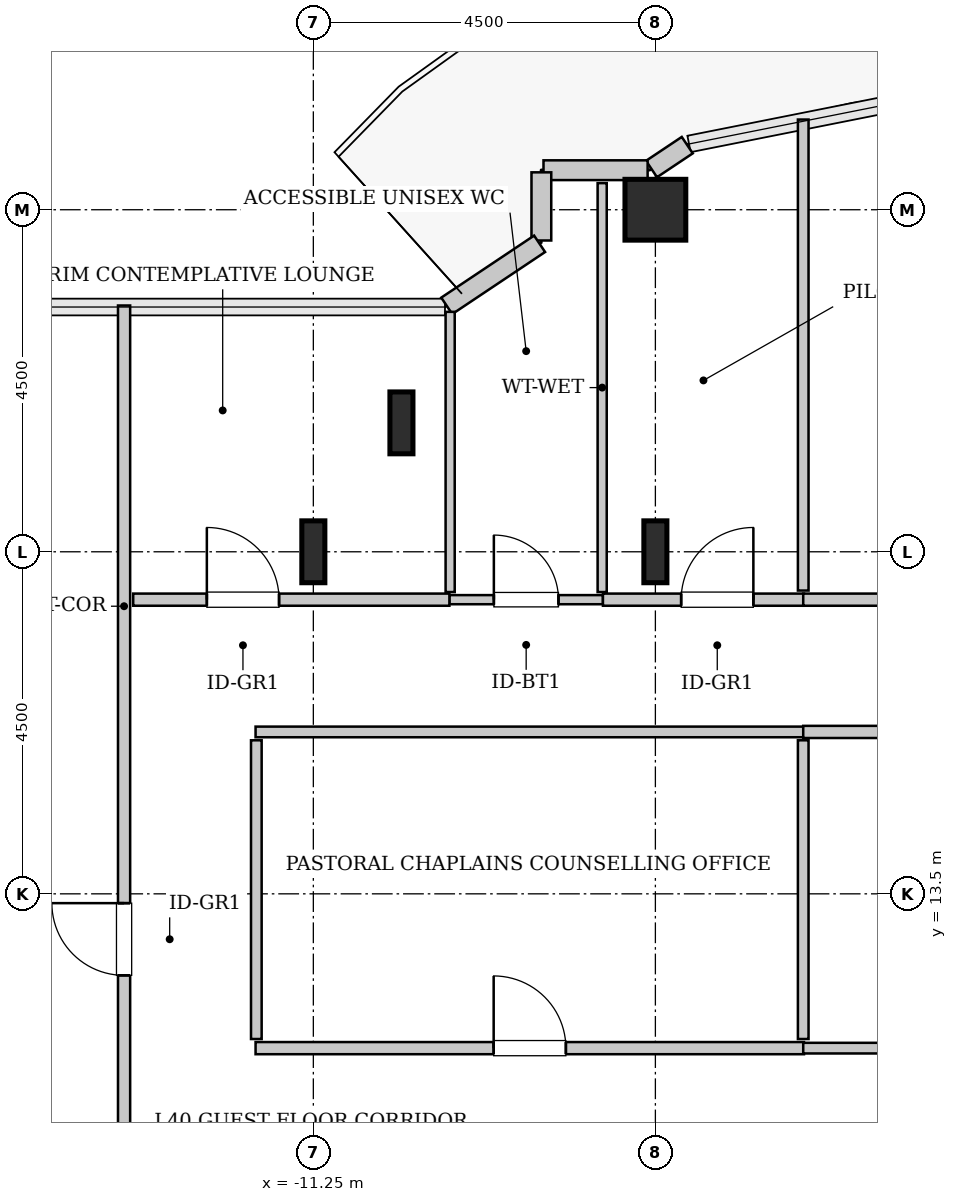
"""IFC4 building model, lengths in metres.
Left out: names, types, materials, properties, quantities, classifications, styles, units other than length and angle.
Written with IfcOpenShell. Run it as: python <this file> out.ifc"""

import sys

from ifc_helpers import new_model, si_unit, direction, frame, frame_2d, origin, origin_2d, place, context, subcontext, project, spatial, rectangle, hollow_rectangle, i_section, extrude, source, transform, mapped, element, fill, save


model = new_model("IFC4")
c1 = context("Model", 3, precision=1e-05, world=origin(), true_north=direction((0.0, 1.0)))
c2 = subcontext(c1, "Body", "Model", "MODEL_VIEW")
j1 = project(units=[si_unit("LENGTHUNIT", "METRE"), si_unit("PLANEANGLEUNIT", "RADIAN")], contexts=[c1])
p1 = place(None, origin())
s1 = spatial("IfcSite", under=j1, at=p1, CompositionType="ELEMENT")
p2 = place(p1, origin())
s2 = spatial("IfcBuilding", under=s1, at=p2, CompositionType="ELEMENT")
p3 = place(p2, frame((0.0, 0.0, 164.0)))
s3 = spatial("IfcBuildingStorey", under=s2, at=p3, CompositionType="ELEMENT", Elevation=164.0)
m1 = source(origin(), c2, "Body", "SweptSolid", [
    extrude(i_section(OverallWidth=0.303, OverallDepth=0.814, WebThickness=0.021, FlangeThickness=0.04, FilletRadius=0.03, at=origin_2d()), origin(), (0.0, 0.0, 1.0), 3.8),
])
for number, where, z_axis, x_axis in (
    (1, (-11.25, 18.0, 0.0), (0.0, 0.0, 1.0), (1.0, 0.0, 0.0)),
    (2, (-10.091, 19.696, 0.0), (0.0, 0.0, 1.0), (1.0, 0.0, 0.0)),
    (3, (-6.75, 18.0, 0.0), (0.0, 0.0, 1.0), (1.0, 0.0, 0.0)),
):
    element("IfcColumn", number, at=place(p3, frame(where, z_axis=z_axis, x_axis=x_axis)), inside=s3, PredefinedType="COLUMN", context=c2, shape_type="MappedRepresentation", body=[
        mapped(m1, transform((0.0, 0.0, 0.0), x_axis=(1.0, 0.0, 0.0), y_axis=(0.0, 1.0, 0.0), z_axis=(0.0, 0.0, 1.0), scale=1.0)),
    ])
m2 = source(origin(), c2, "Body", "SweptSolid", [
    extrude(hollow_rectangle(XDim=0.8, YDim=0.8, WallThickness=0.04, InnerFilletRadius=0.04, OuterFilletRadius=0.08, at=origin_2d()), origin(), (0.0, 0.0, 1.0), 3.8),
])
p4 = place(p3, frame((-6.75, 22.5, 0.0), z_axis=(0.0, 0.0, 1.0), x_axis=(1.0, 0.0, 0.0)))
e4 = element("IfcColumn", 4, at=p4, inside=s3, PredefinedType="COLUMN", context=c2, shape_type="MappedRepresentation", body=[
    mapped(m2, transform((0.0, 0.0, 0.0), x_axis=(1.0, 0.0, 0.0), y_axis=(0.0, 1.0, 0.0), z_axis=(0.0, 0.0, 1.0), scale=1.0)),
])
m3 = source(origin(), c2, "Body", "SweptSolid", [
    extrude(rectangle(XDim=0.565, YDim=0.26, at=frame_2d((0.283, 0.0))), origin(), (0.0, 0.0, 1.0), 3.55),
])
p5 = place(p3, frame((-6.331, 23.35, 0.0), z_axis=(0.0, 0.0, 1.0), x_axis=(-0.831651492666, -0.555297933317, 0.0)))
e5 = element("IfcWall", 5, at=p5, inside=s3, PredefinedType="SOLIDWALL", context=c2, shape_type="MappedRepresentation", body=[
    mapped(m3, transform((0.0, 0.0, 0.0), x_axis=(1.0, 0.0, 0.0), y_axis=(0.0, 1.0, 0.0), z_axis=(0.0, 0.0, 1.0), scale=1.0)),
])
m4 = source(origin(), c2, "Body", "SweptSolid", [
    extrude(rectangle(XDim=1.37, YDim=0.26, at=frame_2d((0.685, 0.0))), origin(), (0.0, 0.0, 1.0), 3.55),
])
p6 = place(p3, frame((-6.852, 23.02, 0.0), z_axis=(0.0, 0.0, 1.0), x_axis=(-1.0, 0.0, 0.0)))
e6 = element("IfcWall", 6, at=p6, inside=s3, PredefinedType="SOLIDWALL", context=c2, shape_type="MappedRepresentation", body=[
    mapped(m4, transform((0.0, 0.0, 0.0), x_axis=(1.0, 0.0, 0.0), y_axis=(0.0, 1.0, 0.0), z_axis=(0.0, 0.0, 1.0), scale=1.0)),
])
m5 = source(origin(), c2, "Body", "SweptSolid", [
    extrude(rectangle(XDim=0.897, YDim=0.26, at=frame_2d((0.448, 0.0))), origin(), (0.0, 0.0, 1.0), 3.55),
])
p7 = place(p3, frame((-8.25, 22.992, 0.0), z_axis=(0.0, 0.0, 1.0), x_axis=(0.0, -1.0, 0.0)))
e7 = element("IfcWall", 7, at=p7, inside=s3, PredefinedType="SOLIDWALL", context=c2, shape_type="MappedRepresentation", body=[
    mapped(m5, transform((0.0, 0.0, 0.0), x_axis=(1.0, 0.0, 0.0), y_axis=(0.0, 1.0, 0.0), z_axis=(0.0, 0.0, 1.0), scale=1.0)),
])
m6 = source(origin(), c2, "Body", "SweptSolid", [
    extrude(rectangle(XDim=1.469, YDim=0.26, at=frame_2d((0.734, 0.0))), origin(), (0.0, 0.0, 1.0), 3.55),
])
p8 = place(p3, frame((-8.273, 22.052, 0.0), z_axis=(0.0, 0.0, 1.0), x_axis=(-0.831461760506, -0.555581983884, 0.0)))
e8 = element("IfcWall", 8, at=p8, inside=s3, PredefinedType="SOLIDWALL", context=c2, shape_type="MappedRepresentation", body=[
    mapped(m6, transform((0.0, 0.0, 0.0), x_axis=(1.0, 0.0, 0.0), y_axis=(0.0, 1.0, 0.0), z_axis=(0.0, 0.0, 1.0), scale=1.0)),
])
m7 = source(origin(), c2, "Body", "SweptSolid", [
    extrude(rectangle(XDim=2.02, YDim=0.12, at=frame_2d((1.01, 0.0))), origin(), (0.0, 0.0, 1.0), 3.535),
])
p9 = place(p3, frame((-9.46, 17.37, 0.0), z_axis=(0.0, 0.0, 1.0), x_axis=(1.0, 0.0, 0.0)))
e9 = element("IfcWall", 9, at=p9, inside=s3, PredefinedType="PLUMBINGWALL", context=c2, shape_type="MappedRepresentation", body=[
    mapped(m7, transform((0.0, 0.0, 0.0), x_axis=(1.0, 0.0, 0.0), y_axis=(0.0, 1.0, 0.0), z_axis=(0.0, 0.0, 1.0), scale=1.0)),
])
p10 = place(p9, frame((0.585, 0.0, 0.0)))
e10 = element("IfcOpeningElement", 10, at=p10, cuts=e9, PredefinedType="OPENING", context=c2, shape_type="SweptSolid", body=[
    extrude(rectangle(XDim=0.85, YDim=2.1, at=frame_2d((0.425, 1.05))), frame((0.0, 0.07, 0.0), z_axis=(0.0, -1.0, 0.0), x_axis=(1.0, 0.0, 0.0)), (0.0, 0.0, 1.0), 0.14),
])
m8 = source(origin(), c2, "Body", "SweptSolid", [
    extrude(rectangle(XDim=5.38, YDim=0.12, at=frame_2d((2.69, 0.0))), origin(), (0.0, 0.0, 1.0), 3.535),
])
p11 = place(p3, frame((-7.45, 17.47, 0.0), z_axis=(0.0, 0.0, 1.0), x_axis=(0.0, 1.0, 0.0)))
e11 = element("IfcWall", 11, at=p11, inside=s3, PredefinedType="PLUMBINGWALL", context=c2, shape_type="MappedRepresentation", body=[
    mapped(m8, transform((0.0, 0.0, 0.0), x_axis=(1.0, 0.0, 0.0), y_axis=(0.0, 1.0, 0.0), z_axis=(0.0, 0.0, 1.0), scale=1.0)),
])
m9 = source(origin(), c2, "Body", "SweptSolid", [
    extrude(rectangle(XDim=3.687, YDim=0.12, at=frame_2d((1.843, 0.0))), origin(), (0.0, 0.0, 1.0), 3.535),
])
p12 = place(p3, frame((-9.45, 17.47, 0.0), z_axis=(0.0, 0.0, 1.0), x_axis=(0.0, 1.0, 0.0)))
e12 = element("IfcWall", 12, at=p12, inside=s3, PredefinedType="PLUMBINGWALL", context=c2, shape_type="MappedRepresentation", body=[
    mapped(m9, transform((0.0, 0.0, 0.0), x_axis=(1.0, 0.0, 0.0), y_axis=(0.0, 1.0, 0.0), z_axis=(0.0, 0.0, 1.0), scale=1.0)),
])
m10 = source(origin(), c2, "Body", "SweptSolid", [
    extrude(rectangle(XDim=12.845, YDim=0.16, at=frame_2d((6.422, 0.0))), origin(), (0.0, 0.0, 1.0), 3.535),
])
p13 = place(p3, frame((-13.74, 8.395, 0.0), z_axis=(0.0, 0.0, 1.0), x_axis=(0.0, 1.0, 0.0)))
e13 = element("IfcWall", 13, at=p13, inside=s3, PredefinedType="PARTITIONING", context=c2, shape_type="MappedRepresentation", body=[
    mapped(m10, transform((0.0, 0.0, 0.0), x_axis=(1.0, 0.0, 0.0), y_axis=(0.0, 1.0, 0.0), z_axis=(0.0, 0.0, 1.0), scale=1.0)),
])
p14 = place(p13, frame((4.032, 0.0, 0.0)))
e14 = element("IfcOpeningElement", 14, at=p14, cuts=e13, PredefinedType="OPENING", context=c2, shape_type="SweptSolid", body=[
    extrude(rectangle(XDim=0.95, YDim=2.1, at=frame_2d((0.475, 1.05))), frame((0.0, 0.09, 0.0), z_axis=(0.0, -1.0, 0.0), x_axis=(1.0, 0.0, 0.0)), (0.0, 0.0, 1.0), 0.18),
])
m11 = source(origin(), c2, "Body", "SweptSolid", [
    extrude(rectangle(XDim=7.215, YDim=0.16, at=frame_2d((3.607, 0.0))), origin(), (0.0, 0.0, 1.0), 3.535),
])
p15 = place(p3, frame((-12.01, 11.47, 0.0), z_axis=(0.0, 0.0, 1.0), x_axis=(1.0, 0.0, 0.0)))
e15 = element("IfcWall", 15, at=p15, inside=s3, PredefinedType="PARTITIONING", context=c2, shape_type="MappedRepresentation", body=[
    mapped(m11, transform((0.0, 0.0, 0.0), x_axis=(1.0, 0.0, 0.0), y_axis=(0.0, 1.0, 0.0), z_axis=(0.0, 0.0, 1.0), scale=1.0)),
])
p16 = place(p15, frame((3.133, 0.0, 0.0)))
e16 = element("IfcOpeningElement", 16, at=p16, cuts=e15, PredefinedType="OPENING", context=c2, shape_type="SweptSolid", body=[
    extrude(rectangle(XDim=0.95, YDim=2.1, at=frame_2d((0.475, 1.05))), frame((0.0, 0.09, 0.0), z_axis=(0.0, -1.0, 0.0), x_axis=(1.0, 0.0, 0.0)), (0.0, 0.0, 1.0), 0.18),
])
m12 = source(origin(), c2, "Body", "SweptSolid", [
    extrude(rectangle(XDim=7.215, YDim=0.14, at=frame_2d((3.607, 0.0))), origin(), (0.0, 0.0, 1.0), 3.535),
])
p17 = place(p3, frame((-12.01, 15.63, 0.0), z_axis=(0.0, 0.0, 1.0), x_axis=(1.0, 0.0, 0.0)))
e17 = element("IfcWall", 17, at=p17, inside=s3, PredefinedType="PARTITIONING", context=c2, shape_type="MappedRepresentation", body=[
    mapped(m12, transform((0.0, 0.0, 0.0), x_axis=(1.0, 0.0, 0.0), y_axis=(0.0, 1.0, 0.0), z_axis=(0.0, 0.0, 1.0), scale=1.0)),
])
m13 = source(origin(), c2, "Body", "SweptSolid", [
    extrude(rectangle(XDim=3.93, YDim=0.14, at=frame_2d((1.965, 0.0))), origin(), (0.0, 0.0, 1.0), 3.535),
])
for number, where, z_axis, x_axis in (
    (18, (-12.0, 11.59, 0.0), (0.0, 0.0, 1.0), (0.0, 1.0, 0.0)),
    (19, (-4.805, 11.59, 0.0), (0.0, 0.0, 1.0), (0.0, 1.0, 0.0)),
):
    element("IfcWall", number, at=place(p3, frame(where, z_axis=z_axis, x_axis=x_axis)), inside=s3, PredefinedType="PARTITIONING", context=c2, shape_type="MappedRepresentation", body=[
        mapped(m13, transform((0.0, 0.0, 0.0), x_axis=(1.0, 0.0, 0.0), y_axis=(0.0, 1.0, 0.0), z_axis=(0.0, 0.0, 1.0), scale=1.0)),
    ])
m14 = source(origin(), c2, "Body", "SweptSolid", [
    extrude(rectangle(XDim=2.645, YDim=0.16, at=frame_2d((1.323, 0.0))), origin(), (0.0, 0.0, 1.0), 3.535),
])
p18 = place(p3, frame((-7.44, 17.37, 0.0), z_axis=(0.0, 0.0, 1.0), x_axis=(1.0, 0.0, 0.0)))
e20 = element("IfcWall", 20, at=p18, inside=s3, PredefinedType="PARTITIONING", context=c2, shape_type="MappedRepresentation", body=[
    mapped(m14, transform((0.0, 0.0, 0.0), x_axis=(1.0, 0.0, 0.0), y_axis=(0.0, 1.0, 0.0), z_axis=(0.0, 0.0, 1.0), scale=1.0)),
])
p19 = place(p18, frame((1.029, 0.0, 0.0)))
e21 = element("IfcOpeningElement", 21, at=p19, cuts=e20, PredefinedType="OPENING", context=c2, shape_type="SweptSolid", body=[
    extrude(rectangle(XDim=0.95, YDim=2.1, at=frame_2d((0.475, 1.05))), frame((0.0, 0.09, 0.0), z_axis=(0.0, -1.0, 0.0), x_axis=(1.0, 0.0, 0.0)), (0.0, 0.0, 1.0), 0.18),
])
m15 = source(origin(), c2, "Body", "SweptSolid", [
    extrude(rectangle(XDim=6.197, YDim=0.14, at=frame_2d((3.098, 0.0))), origin(), (0.0, 0.0, 1.0), 3.535),
])
p20 = place(p3, frame((-4.805, 17.49, 0.0), z_axis=(0.0, 0.0, 1.0), x_axis=(0.0, 1.0, 0.0)))
e22 = element("IfcWall", 22, at=p20, inside=s3, PredefinedType="PARTITIONING", context=c2, shape_type="MappedRepresentation", body=[
    mapped(m15, transform((0.0, 0.0, 0.0), x_axis=(1.0, 0.0, 0.0), y_axis=(0.0, 1.0, 0.0), z_axis=(0.0, 0.0, 1.0), scale=1.0)),
])
m16 = source(origin(), c2, "Body", "SweptSolid", [
    extrude(rectangle(XDim=4.16, YDim=0.16, at=frame_2d((2.08, 0.0))), origin(), (0.0, 0.0, 1.0), 3.535),
])
p21 = place(p3, frame((-13.62, 17.37, 0.0), z_axis=(0.0, 0.0, 1.0), x_axis=(1.0, 0.0, 0.0)))
e23 = element("IfcWall", 23, at=p21, inside=s3, PredefinedType="PARTITIONING", context=c2, shape_type="MappedRepresentation", body=[
    mapped(m16, transform((0.0, 0.0, 0.0), x_axis=(1.0, 0.0, 0.0), y_axis=(0.0, 1.0, 0.0), z_axis=(0.0, 0.0, 1.0), scale=1.0)),
])
p22 = place(p21, frame((0.969, 0.0, 0.0)))
e24 = element("IfcOpeningElement", 24, at=p22, cuts=e23, PredefinedType="OPENING", context=c2, shape_type="SweptSolid", body=[
    extrude(rectangle(XDim=0.95, YDim=2.1, at=frame_2d((0.475, 1.05))), frame((0.0, 0.09, 0.0), z_axis=(0.0, -1.0, 0.0), x_axis=(1.0, 0.0, 0.0)), (0.0, 0.0, 1.0), 0.18),
])
m17 = source(origin(), c2, "Body", "SweptSolid", [
    extrude(rectangle(XDim=11.61, YDim=0.16, at=frame_2d((5.805, 0.0))), origin(), (0.0, 0.0, 1.0), 3.535),
])
p23 = place(p3, frame((-4.805, 17.37, 0.0), z_axis=(0.0, 0.0, 1.0), x_axis=(1.0, 0.0, 0.0)))
e25 = element("IfcWall", 25, at=p23, inside=s3, PredefinedType="PARTITIONING", context=c2, shape_type="MappedRepresentation", body=[
    mapped(m17, transform((0.0, 0.0, 0.0), x_axis=(1.0, 0.0, 0.0), y_axis=(0.0, 1.0, 0.0), z_axis=(0.0, 0.0, 1.0), scale=1.0)),
])
p24 = place(p23, frame((5.33, 0.0, 0.0)))
e26 = element("IfcOpeningElement", 26, at=p24, cuts=e25, PredefinedType="OPENING", context=c2, shape_type="SweptSolid", body=[
    extrude(rectangle(XDim=0.95, YDim=2.1, at=frame_2d((0.475, 1.05))), frame((0.0, 0.09, 0.0), z_axis=(0.0, -1.0, 0.0), x_axis=(1.0, 0.0, 0.0)), (0.0, 0.0, 1.0), 0.18),
])
p25 = place(p3, frame((-4.805, 15.63, 0.0), z_axis=(0.0, 0.0, 1.0), x_axis=(1.0, 0.0, 0.0)))
e27 = element("IfcWall", 27, at=p25, inside=s3, PredefinedType="PARTITIONING", context=c2, shape_type="MappedRepresentation", body=[
    mapped(m17, transform((0.0, 0.0, 0.0), x_axis=(1.0, 0.0, 0.0), y_axis=(0.0, 1.0, 0.0), z_axis=(0.0, 0.0, 1.0), scale=1.0)),
])
p26 = place(p25, frame((5.33, 0.0, 0.0)))
e28 = element("IfcOpeningElement", 28, at=p26, cuts=e27, PredefinedType="OPENING", context=c2, shape_type="SweptSolid", body=[
    extrude(rectangle(XDim=0.95, YDim=2.1, at=frame_2d((0.475, 1.05))), frame((0.0, 0.09, 0.0), z_axis=(0.0, -1.0, 0.0), x_axis=(1.0, 0.0, 0.0)), (0.0, 0.0, 1.0), 0.18),
])
m18 = source(origin(), c2, "Body", "SweptSolid", [
    extrude(rectangle(XDim=11.61, YDim=0.14, at=frame_2d((5.805, 0.0))), origin(), (0.0, 0.0, 1.0), 3.535),
])
p27 = place(p3, frame((-4.805, 11.47, 0.0), z_axis=(0.0, 0.0, 1.0), x_axis=(1.0, 0.0, 0.0)))
e29 = element("IfcWall", 29, at=p27, inside=s3, PredefinedType="PARTITIONING", context=c2, shape_type="MappedRepresentation", body=[
    mapped(m18, transform((0.0, 0.0, 0.0), x_axis=(1.0, 0.0, 0.0), y_axis=(0.0, 1.0, 0.0), z_axis=(0.0, 0.0, 1.0), scale=1.0)),
])
m19 = source(origin(), c2, "Body", "SweptSolid", [
    extrude(rectangle(XDim=0.85, YDim=2.1, at=frame_2d((0.425, 1.05))), frame((0.0, 0.025, 0.0), z_axis=(0.0, -1.0, 0.0), x_axis=(1.0, 0.0, 0.0)), (0.0, 0.0, 1.0), 0.05),
])
p28 = place(p10, origin())
e30 = element("IfcDoor", 30, at=p28, inside=s3, OperationType="SINGLE_SWING_LEFT", PredefinedType="DOOR", context=c2, shape_type="MappedRepresentation", body=[
    mapped(m19, transform((0.0, 0.0, 0.0), x_axis=(1.0, 0.0, 0.0), y_axis=(0.0, 1.0, 0.0), z_axis=(0.0, 0.0, 1.0), scale=1.0)),
])
fill(e10, e30)
m20 = source(origin(), c2, "Body", "SweptSolid", [
    extrude(rectangle(XDim=0.95, YDim=2.1, at=frame_2d((0.475, 1.05))), frame((0.0, 0.025, 0.0), z_axis=(0.0, -1.0, 0.0), x_axis=(1.0, 0.0, 0.0)), (0.0, 0.0, 1.0), 0.05),
])
p29 = place(p14, origin())
e31 = element("IfcDoor", 31, at=p29, inside=s3, OperationType="SINGLE_SWING_RIGHT", PredefinedType="DOOR", context=c2, shape_type="MappedRepresentation", body=[
    mapped(m20, transform((0.0, 0.0, 0.0), x_axis=(1.0, 0.0, 0.0), y_axis=(0.0, 1.0, 0.0), z_axis=(0.0, 0.0, 1.0), scale=1.0)),
])
fill(e14, e31)
p30 = place(p16, origin())
e32 = element("IfcDoor", 32, at=p30, inside=s3, OperationType="SINGLE_SWING_LEFT", PredefinedType="DOOR", context=c2, shape_type="MappedRepresentation", body=[
    mapped(m20, transform((0.0, 0.0, 0.0), x_axis=(1.0, 0.0, 0.0), y_axis=(0.0, 1.0, 0.0), z_axis=(0.0, 0.0, 1.0), scale=1.0)),
])
fill(e16, e32)
p31 = place(p19, origin())
e33 = element("IfcDoor", 33, at=p31, inside=s3, OperationType="SINGLE_SWING_RIGHT", PredefinedType="DOOR", context=c2, shape_type="MappedRepresentation", body=[
    mapped(m20, transform((0.0, 0.0, 0.0), x_axis=(1.0, 0.0, 0.0), y_axis=(0.0, 1.0, 0.0), z_axis=(0.0, 0.0, 1.0), scale=1.0)),
])
fill(e21, e33)
p32 = place(p22, origin())
e34 = element("IfcDoor", 34, at=p32, inside=s3, OperationType="SINGLE_SWING_LEFT", PredefinedType="DOOR", context=c2, shape_type="MappedRepresentation", body=[
    mapped(m20, transform((0.0, 0.0, 0.0), x_axis=(1.0, 0.0, 0.0), y_axis=(0.0, 1.0, 0.0), z_axis=(0.0, 0.0, 1.0), scale=1.0)),
])
fill(e24, e34)
save(model, sys.argv[1])
